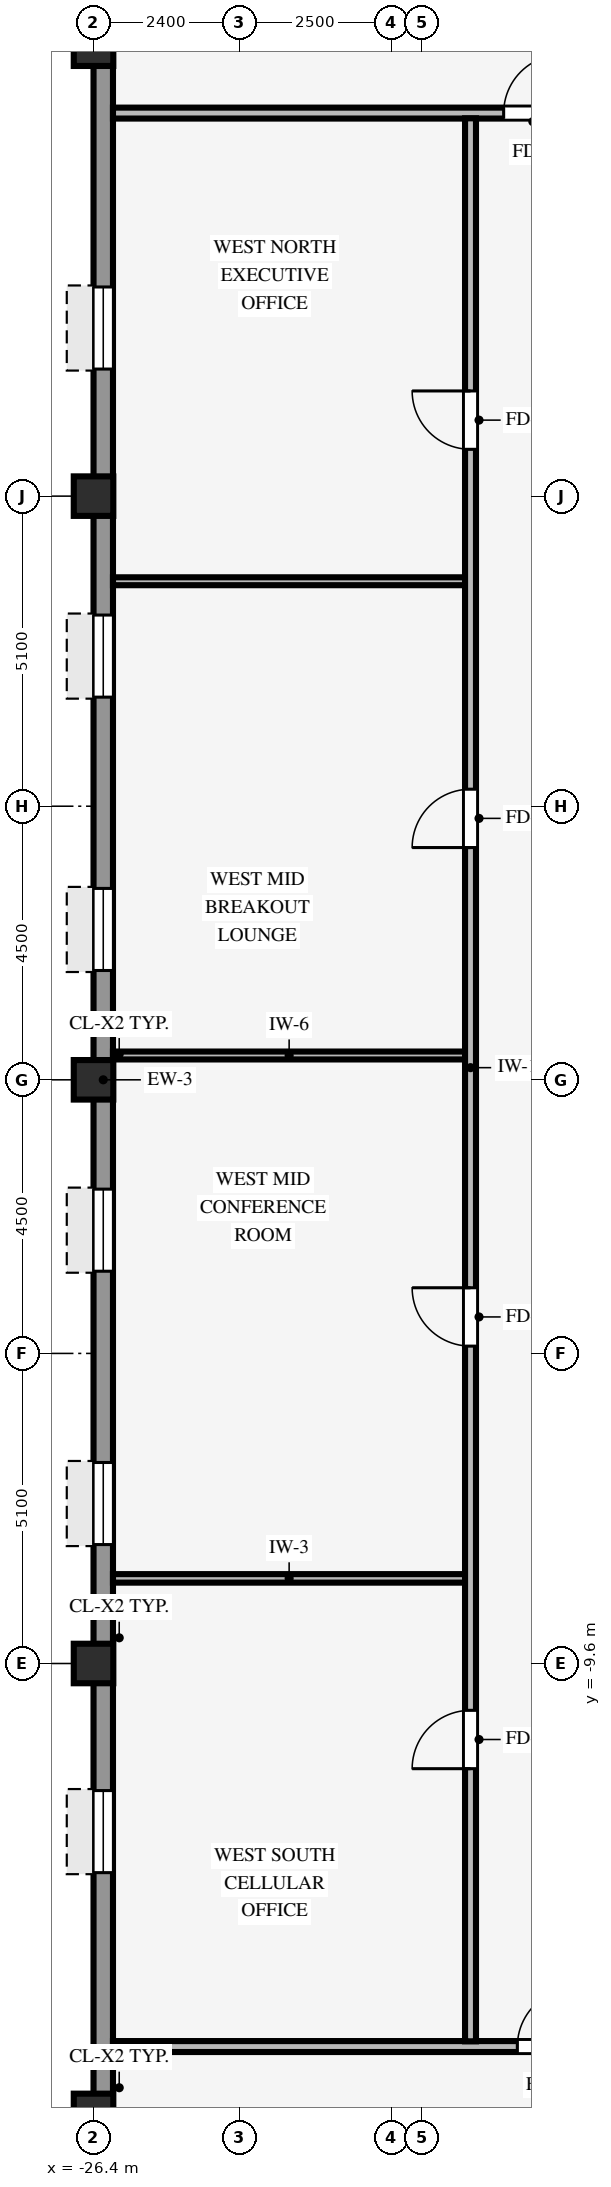
"""IFC4 building model, lengths in metres.
Left out: names, types, materials, properties, quantities, classifications, styles, units other than length and angle.
Written with IfcOpenShell. Run it as: python <this file> out.ifc"""

import sys

from ifc_helpers import new_model, si_unit, direction, frame, frame_2d, origin, origin_2d, place, context, subcontext, project, spatial, rectangle, hollow_rectangle, extrude, source, transform, mapped, element, fill, save


model = new_model("IFC4")
c1 = context("Model", 3, precision=1e-05, world=origin(), true_north=direction((0.0, 1.0)))
c2 = subcontext(c1, "Body", "Model", "MODEL_VIEW")
j1 = project(units=[si_unit("LENGTHUNIT", "METRE"), si_unit("PLANEANGLEUNIT", "RADIAN")], contexts=[c1])
p1 = place(None, origin())
s1 = spatial("IfcSite", under=j1, at=p1, CompositionType="ELEMENT")
p2 = place(p1, origin())
s2 = spatial("IfcBuilding", under=s1, at=p2, CompositionType="ELEMENT")
p3 = place(p2, frame((0.0, 0.0, 164.0)))
s3 = spatial("IfcBuildingStorey", under=s2, at=p3, CompositionType="ELEMENT", Elevation=164.0)
for number, where, z_axis, x_axis in (
    (1, (-26.4, -17.0, 0.0), (0.0, 0.0, 1.0), (1.0, 0.0, 0.0)),
    (2, (-26.4, -9.6, 0.0), (0.0, 0.0, 1.0), (1.0, 0.0, 0.0)),
    (3, (-26.4, 0.0, 0.0), (0.0, 0.0, 1.0), (1.0, 0.0, 0.0)),
    (4, (-26.4, 9.6, 0.0), (0.0, 0.0, 1.0), (1.0, 0.0, 0.0)),
    (5, (-26.4, 17.0, 0.0), (0.0, 0.0, 1.0), (1.0, 0.0, 0.0)),
):
    element("IfcColumn", number, at=place(p3, frame(where, z_axis=z_axis, x_axis=x_axis)), inside=s3, PredefinedType="COLUMN", context=c2, shape_type="SweptSolid", body=[
        extrude(hollow_rectangle(XDim=0.65, YDim=0.65, WallThickness=0.04, InnerFilletRadius=0.04, OuterFilletRadius=0.08, at=origin_2d()), origin(), (0.0, 0.0, 1.0), 3.25),
    ])
p4 = place(p3, frame((-26.24, -20.784, 0.0), z_axis=(0.0, 0.0, 1.0), x_axis=(0.0, 1.0, 0.0)))
e6 = element("IfcWall", 6, at=p4, inside=s3, PredefinedType="STANDARD", context=c2, shape_type="SweptSolid", body=[
    extrude(rectangle(XDim=41.568, YDim=0.32, at=frame_2d((20.784, 0.0))), origin(), (0.0, 0.0, 1.0), 2.585),
])
p5 = place(p4, frame((1.448, 0.0, 0.8)))
e7 = element("IfcOpeningElement", 7, at=p5, cuts=e6, PredefinedType="OPENING", context=c2, shape_type="SweptSolid", body=[
    extrude(rectangle(XDim=1.35, YDim=1.56, at=frame_2d((0.675, 0.78))), frame((0.0, 0.17, 0.0), z_axis=(0.0, -1.0, 0.0), x_axis=(1.0, 0.0, 0.0)), (0.0, 0.0, 1.0), 0.34),
])
p6 = place(p4, frame((7.744, 0.0, 0.8)))
e8 = element("IfcOpeningElement", 8, at=p6, cuts=e6, PredefinedType="OPENING", context=c2, shape_type="SweptSolid", body=[
    extrude(rectangle(XDim=1.35, YDim=1.56, at=frame_2d((0.675, 0.78))), frame((0.0, 0.17, 0.0), z_axis=(0.0, -1.0, 0.0), x_axis=(1.0, 0.0, 0.0)), (0.0, 0.0, 1.0), 0.34),
])
p7 = place(p4, frame((13.14, 0.0, 0.8)))
e9 = element("IfcOpeningElement", 9, at=p7, cuts=e6, PredefinedType="OPENING", context=c2, shape_type="SweptSolid", body=[
    extrude(rectangle(XDim=1.35, YDim=1.56, at=frame_2d((0.675, 0.78))), frame((0.0, 0.17, 0.0), z_axis=(0.0, -1.0, 0.0), x_axis=(1.0, 0.0, 0.0)), (0.0, 0.0, 1.0), 0.34),
])
p8 = place(p4, frame((17.636, 0.0, 0.8)))
e10 = element("IfcOpeningElement", 10, at=p8, cuts=e6, PredefinedType="OPENING", context=c2, shape_type="SweptSolid", body=[
    extrude(rectangle(XDim=1.35, YDim=1.56, at=frame_2d((0.675, 0.78))), frame((0.0, 0.17, 0.0), z_axis=(0.0, -1.0, 0.0), x_axis=(1.0, 0.0, 0.0)), (0.0, 0.0, 1.0), 0.34),
])
p9 = place(p4, frame((22.582, 0.0, 0.8)))
e11 = element("IfcOpeningElement", 11, at=p9, cuts=e6, PredefinedType="OPENING", context=c2, shape_type="SweptSolid", body=[
    extrude(rectangle(XDim=1.35, YDim=1.56, at=frame_2d((0.675, 0.78))), frame((0.0, 0.17, 0.0), z_axis=(0.0, -1.0, 0.0), x_axis=(1.0, 0.0, 0.0)), (0.0, 0.0, 1.0), 0.34),
])
p10 = place(p4, frame((27.078, 0.0, 0.8)))
e12 = element("IfcOpeningElement", 12, at=p10, cuts=e6, PredefinedType="OPENING", context=c2, shape_type="SweptSolid", body=[
    extrude(rectangle(XDim=1.35, YDim=1.56, at=frame_2d((0.675, 0.78))), frame((0.0, 0.17, 0.0), z_axis=(0.0, -1.0, 0.0), x_axis=(1.0, 0.0, 0.0)), (0.0, 0.0, 1.0), 0.34),
])
p11 = place(p4, frame((32.474, 0.0, 0.8)))
e13 = element("IfcOpeningElement", 13, at=p11, cuts=e6, PredefinedType="OPENING", context=c2, shape_type="SweptSolid", body=[
    extrude(rectangle(XDim=1.35, YDim=1.56, at=frame_2d((0.675, 0.78))), frame((0.0, 0.17, 0.0), z_axis=(0.0, -1.0, 0.0), x_axis=(1.0, 0.0, 0.0)), (0.0, 0.0, 1.0), 0.34),
])
p12 = place(p4, frame((38.77, 0.0, 0.8)))
e14 = element("IfcOpeningElement", 14, at=p12, cuts=e6, PredefinedType="OPENING", context=c2, shape_type="SweptSolid", body=[
    extrude(rectangle(XDim=1.35, YDim=1.56, at=frame_2d((0.675, 0.78))), frame((0.0, 0.17, 0.0), z_axis=(0.0, -1.0, 0.0), x_axis=(1.0, 0.0, 0.0)), (0.0, 0.0, 1.0), 0.34),
])
p13 = place(p3, frame((-26.08, -15.9, 0.0), z_axis=(0.0, 0.0, 1.0), x_axis=(1.0, 0.0, 0.0)))
e15 = element("IfcWall", 15, at=p13, inside=s3, PredefinedType="PARTITIONING", context=c2, shape_type="SweptSolid", body=[
    extrude(rectangle(XDim=52.16, YDim=0.18, at=frame_2d((26.08, 0.0))), origin(), (0.0, 0.0, 1.0), 3.24),
])
p14 = place(p13, frame((41.35, 0.0, 0.0)))
e16 = element("IfcOpeningElement", 16, at=p14, cuts=e15, PredefinedType="OPENING", context=c2, shape_type="SweptSolid", body=[
    extrude(rectangle(XDim=0.96, YDim=2.1, at=frame_2d((0.48, 1.05))), frame((0.0, 0.1, 0.0), z_axis=(0.0, -1.0, 0.0), x_axis=(1.0, 0.0, 0.0)), (0.0, 0.0, 1.0), 0.2),
])
p15 = place(p13, frame((23.34, 0.0, 0.0)))
e17 = element("IfcOpeningElement", 17, at=p15, cuts=e15, PredefinedType="OPENING", context=c2, shape_type="SweptSolid", body=[
    extrude(rectangle(XDim=0.96, YDim=2.1, at=frame_2d((0.48, 1.05))), frame((0.0, 0.1, 0.0), z_axis=(0.0, -1.0, 0.0), x_axis=(1.0, 0.0, 0.0)), (0.0, 0.0, 1.0), 0.2),
])
p16 = place(p13, frame((14.4, 0.0, 0.0)))
e18 = element("IfcOpeningElement", 18, at=p16, cuts=e15, PredefinedType="OPENING", context=c2, shape_type="SweptSolid", body=[
    extrude(rectangle(XDim=0.96, YDim=2.1, at=frame_2d((0.48, 1.05))), frame((0.0, 0.1, 0.0), z_axis=(0.0, -1.0, 0.0), x_axis=(1.0, 0.0, 0.0)), (0.0, 0.0, 1.0), 0.2),
])
p17 = place(p13, frame((30.005, 0.0, 0.0)))
e19 = element("IfcOpeningElement", 19, at=p17, cuts=e15, PredefinedType="OPENING", context=c2, shape_type="SweptSolid", body=[
    extrude(rectangle(XDim=0.96, YDim=2.1, at=frame_2d((0.48, 1.05))), frame((0.0, 0.1, 0.0), z_axis=(0.0, -1.0, 0.0), x_axis=(1.0, 0.0, 0.0)), (0.0, 0.0, 1.0), 0.2),
])
p18 = place(p13, frame((6.65, 0.0, 0.0)))
e20 = element("IfcOpeningElement", 20, at=p18, cuts=e15, PredefinedType="OPENING", context=c2, shape_type="SweptSolid", body=[
    extrude(rectangle(XDim=0.96, YDim=2.1, at=frame_2d((0.48, 1.05))), frame((0.0, 0.1, 0.0), z_axis=(0.0, -1.0, 0.0), x_axis=(1.0, 0.0, 0.0)), (0.0, 0.0, 1.0), 0.2),
])
p19 = place(p3, frame((-26.08, -8.2, 0.0), z_axis=(0.0, 0.0, 1.0), x_axis=(1.0, 0.0, 0.0)))
e21 = element("IfcWall", 21, at=p19, inside=s3, PredefinedType="PARTITIONING", context=c2, shape_type="SweptSolid", body=[
    extrude(rectangle(XDim=5.794, YDim=0.14, at=frame_2d((2.897, 0.0))), origin(), (0.0, 0.0, 1.0), 3.24),
])
p20 = place(p3, frame((-26.08, 0.4, 0.0), z_axis=(0.0, 0.0, 1.0), x_axis=(1.0, 0.0, 0.0)))
e22 = element("IfcWall", 22, at=p20, inside=s3, PredefinedType="PARTITIONING", context=c2, shape_type="SweptSolid", body=[
    extrude(rectangle(XDim=5.794, YDim=0.13, at=frame_2d((2.897, 0.0))), origin(), (0.0, 0.0, 1.0), 2.696),
])
p21 = place(p3, frame((-26.08, 8.2, 0.0), z_axis=(0.0, 0.0, 1.0), x_axis=(1.0, 0.0, 0.0)))
e23 = element("IfcWall", 23, at=p21, inside=s3, PredefinedType="PARTITIONING", context=c2, shape_type="SweptSolid", body=[
    extrude(rectangle(XDim=5.794, YDim=0.13, at=frame_2d((2.897, 0.0))), origin(), (0.0, 0.0, 1.0), 3.24),
])
p22 = place(p3, frame((-26.08, 15.9, 0.0), z_axis=(0.0, 0.0, 1.0), x_axis=(1.0, 0.0, 0.0)))
e24 = element("IfcWall", 24, at=p22, inside=s3, PredefinedType="PARTITIONING", context=c2, shape_type="SweptSolid", body=[
    extrude(rectangle(XDim=52.16, YDim=0.18, at=frame_2d((26.08, 0.0))), origin(), (0.0, 0.0, 1.0), 3.24),
])
p23 = place(p22, frame((24.5, 0.0, 0.0)))
e25 = element("IfcOpeningElement", 25, at=p23, cuts=e24, PredefinedType="OPENING", context=c2, shape_type="SweptSolid", body=[
    extrude(rectangle(XDim=0.96, YDim=2.1, at=frame_2d((0.48, 1.05))), frame((0.0, 0.1, 0.0), z_axis=(0.0, -1.0, 0.0), x_axis=(1.0, 0.0, 0.0)), (0.0, 0.0, 1.0), 0.2),
])
p24 = place(p22, frame((40.5, 0.0, 0.0)))
e26 = element("IfcOpeningElement", 26, at=p24, cuts=e24, PredefinedType="OPENING", context=c2, shape_type="SweptSolid", body=[
    extrude(rectangle(XDim=0.96, YDim=2.1, at=frame_2d((0.48, 1.05))), frame((0.0, 0.1, 0.0), z_axis=(0.0, -1.0, 0.0), x_axis=(1.0, 0.0, 0.0)), (0.0, 0.0, 1.0), 0.2),
])
p25 = place(p22, frame((13.16, 0.0, 0.0)))
e27 = element("IfcOpeningElement", 27, at=p25, cuts=e24, PredefinedType="OPENING", context=c2, shape_type="SweptSolid", body=[
    extrude(rectangle(XDim=0.96, YDim=2.1, at=frame_2d((0.48, 1.05))), frame((0.0, 0.1, 0.0), z_axis=(0.0, -1.0, 0.0), x_axis=(1.0, 0.0, 0.0)), (0.0, 0.0, 1.0), 0.2),
])
p26 = place(p22, frame((6.425, 0.0, 0.0)))
e28 = element("IfcOpeningElement", 28, at=p26, cuts=e24, PredefinedType="OPENING", context=c2, shape_type="SweptSolid", body=[
    extrude(rectangle(XDim=0.96, YDim=2.1, at=frame_2d((0.48, 1.05))), frame((0.0, 0.1, 0.0), z_axis=(0.0, -1.0, 0.0), x_axis=(1.0, 0.0, 0.0)), (0.0, 0.0, 1.0), 0.2),
])
p27 = place(p3, frame((-20.2, -15.814, 0.0), z_axis=(0.0, 0.0, 1.0), x_axis=(0.0, 1.0, 0.0)))
e29 = element("IfcWall", 29, at=p27, inside=s3, PredefinedType="PARTITIONING", context=c2, shape_type="SweptSolid", body=[
    extrude(rectangle(XDim=31.628, YDim=0.18, at=frame_2d((15.814, 0.0))), origin(), (0.0, 0.0, 1.0), 3.24),
])
p28 = place(p27, frame((11.434, 0.0, 0.0)))
e30 = element("IfcOpeningElement", 30, at=p28, cuts=e29, PredefinedType="OPENING", context=c2, shape_type="SweptSolid", body=[
    extrude(rectangle(XDim=0.96, YDim=2.1, at=frame_2d((0.48, 1.05))), frame((0.0, 0.1, 0.0), z_axis=(0.0, -1.0, 0.0), x_axis=(1.0, 0.0, 0.0)), (0.0, 0.0, 1.0), 0.2),
])
p29 = place(p27, frame((19.634, 0.0, 0.0)))
e31 = element("IfcOpeningElement", 31, at=p29, cuts=e29, PredefinedType="OPENING", context=c2, shape_type="SweptSolid", body=[
    extrude(rectangle(XDim=0.96, YDim=2.1, at=frame_2d((0.48, 1.05))), frame((0.0, 0.1, 0.0), z_axis=(0.0, -1.0, 0.0), x_axis=(1.0, 0.0, 0.0)), (0.0, 0.0, 1.0), 0.2),
])
p30 = place(p27, frame((4.484, 0.0, 0.0)))
e32 = element("IfcOpeningElement", 32, at=p30, cuts=e29, PredefinedType="OPENING", context=c2, shape_type="SweptSolid", body=[
    extrude(rectangle(XDim=0.96, YDim=2.1, at=frame_2d((0.48, 1.05))), frame((0.0, 0.1, 0.0), z_axis=(0.0, -1.0, 0.0), x_axis=(1.0, 0.0, 0.0)), (0.0, 0.0, 1.0), 0.2),
])
p31 = place(p27, frame((26.184, 0.0, 0.0)))
e33 = element("IfcOpeningElement", 33, at=p31, cuts=e29, PredefinedType="OPENING", context=c2, shape_type="SweptSolid", body=[
    extrude(rectangle(XDim=0.96, YDim=2.1, at=frame_2d((0.48, 1.05))), frame((0.0, 0.1, 0.0), z_axis=(0.0, -1.0, 0.0), x_axis=(1.0, 0.0, 0.0)), (0.0, 0.0, 1.0), 0.2),
])
m1 = source(origin(), c2, "Body", "SweptSolid", [
    extrude(rectangle(XDim=1.35, YDim=1.56, at=frame_2d((0.675, 0.78))), frame((0.0, 0.03, 0.0), z_axis=(0.0, -1.0, 0.0), x_axis=(1.0, 0.0, 0.0)), (0.0, 0.0, 1.0), 0.06),
])
p32 = place(p6, origin())
e34 = element("IfcWindow", 34, at=p32, inside=s3, PartitioningType="SINGLE_PANEL", PredefinedType="WINDOW", context=c2, shape_type="MappedRepresentation", body=[
    mapped(m1, transform((0.0, 0.0, 0.0), scale=1.0)),
])
fill(e8, e34)
p33 = place(p7, origin())
e35 = element("IfcWindow", 35, at=p33, inside=s3, PartitioningType="SINGLE_PANEL", PredefinedType="WINDOW", context=c2, shape_type="MappedRepresentation", body=[
    mapped(m1, transform((0.0, 0.0, 0.0), scale=1.0)),
])
fill(e9, e35)
p34 = place(p8, origin())
e36 = element("IfcWindow", 36, at=p34, inside=s3, PartitioningType="SINGLE_PANEL", PredefinedType="WINDOW", context=c2, shape_type="MappedRepresentation", body=[
    mapped(m1, transform((0.0, 0.0, 0.0), scale=1.0)),
])
fill(e10, e36)
p35 = place(p9, origin())
e37 = element("IfcWindow", 37, at=p35, inside=s3, PartitioningType="SINGLE_PANEL", PredefinedType="WINDOW", context=c2, shape_type="MappedRepresentation", body=[
    mapped(m1, transform((0.0, 0.0, 0.0), scale=1.0)),
])
fill(e11, e37)
p36 = place(p10, origin())
e38 = element("IfcWindow", 38, at=p36, inside=s3, PartitioningType="SINGLE_PANEL", PredefinedType="WINDOW", context=c2, shape_type="MappedRepresentation", body=[
    mapped(m1, transform((0.0, 0.0, 0.0), scale=1.0)),
])
fill(e12, e38)
p37 = place(p11, origin())
e39 = element("IfcWindow", 39, at=p37, inside=s3, PartitioningType="SINGLE_PANEL", PredefinedType="WINDOW", context=c2, shape_type="MappedRepresentation", body=[
    mapped(m1, transform((0.0, 0.0, 0.0), scale=1.0)),
])
fill(e13, e39)
m2 = source(origin(), c2, "Body", "SweptSolid", [
    extrude(rectangle(XDim=0.96, YDim=2.1, at=frame_2d((0.48, 1.05))), frame((0.0, 0.025, 0.0), z_axis=(0.0, -1.0, 0.0), x_axis=(1.0, 0.0, 0.0)), (0.0, 0.0, 1.0), 0.05),
])
p38 = place(p28, origin())
e40 = element("IfcDoor", 40, at=p38, inside=s3, OperationType="SINGLE_SWING_RIGHT", PredefinedType="DOOR", context=c2, shape_type="MappedRepresentation", body=[
    mapped(m2, transform((0.0, 0.0, 0.0), scale=1.0)),
])
fill(e30, e40)
p39 = place(p29, origin())
e41 = element("IfcDoor", 41, at=p39, inside=s3, OperationType="SINGLE_SWING_LEFT", PredefinedType="DOOR", context=c2, shape_type="MappedRepresentation", body=[
    mapped(m2, transform((0.0, 0.0, 0.0), scale=1.0)),
])
fill(e31, e41)
p40 = place(p30, origin())
e42 = element("IfcDoor", 42, at=p40, inside=s3, OperationType="SINGLE_SWING_LEFT", PredefinedType="DOOR", context=c2, shape_type="MappedRepresentation", body=[
    mapped(m2, transform((0.0, 0.0, 0.0), scale=1.0)),
])
fill(e32, e42)
p41 = place(p31, origin())
e43 = element("IfcDoor", 43, at=p41, inside=s3, OperationType="SINGLE_SWING_RIGHT", PredefinedType="DOOR", context=c2, shape_type="MappedRepresentation", body=[
    mapped(m2, transform((0.0, 0.0, 0.0), scale=1.0)),
])
fill(e33, e43)
p42 = place(p18, origin())
e44 = element("IfcDoor", 44, at=p42, inside=s3, OperationType="SINGLE_SWING_RIGHT", PredefinedType="DOOR", context=c2, shape_type="MappedRepresentation", body=[
    mapped(m2, transform((0.0, 0.0, 0.0), scale=1.0)),
])
fill(e20, e44)
p43 = place(p26, origin())
e45 = element("IfcDoor", 45, at=p43, inside=s3, OperationType="SINGLE_SWING_RIGHT", PredefinedType="DOOR", context=c2, shape_type="MappedRepresentation", body=[
    mapped(m2, transform((0.0, 0.0, 0.0), scale=1.0)),
])
fill(e28, e45)
save(model, sys.argv[1])
